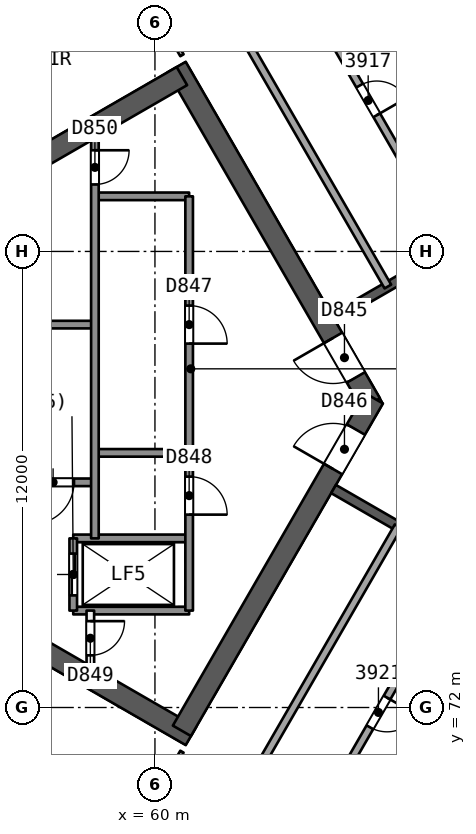
"""IFC4 building model, lengths in metres.
Left out: names, types, materials, properties, quantities, classifications, styles, units other than length and angle.
Written with IfcOpenShell. Run it as: python <this file> out.ifc"""

import sys

from ifc_helpers import new_model, si_unit, direction, frame, frame_2d, origin, place, context, subcontext, project, spatial, rectangle, extrude, element, fill, save


model = new_model("IFC4")
c1 = context("Model", 3, precision=1e-05, world=origin(), true_north=direction((0.0, 1.0)))
c2 = subcontext(c1, "Body", "Model", "MODEL_VIEW")
j1 = project(units=[si_unit("LENGTHUNIT", "METRE"), si_unit("PLANEANGLEUNIT", "RADIAN")], contexts=[c1])
p1 = place(None, origin())
s1 = spatial("IfcSite", under=j1, at=p1, CompositionType="ELEMENT")
p2 = place(p1, origin())
s2 = spatial("IfcBuilding", under=s1, at=p2, CompositionType="ELEMENT")
p3 = place(p2, frame((0.0, 0.0, 163.7)))
s3 = spatial("IfcBuildingStorey", under=s2, at=p3, CompositionType="ELEMENT", Elevation=163.7)
p4 = place(p3, frame((65.682, 80.0, 0.0), z_axis=(0.0, 0.0, 1.0), x_axis=(-0.500000202252, 0.866025287014, 0.0)))
e1 = element("IfcWall", 1, at=p4, inside=s3, PredefinedType="SHEAR", context=c2, shape_type="SweptSolid", body=[
    extrude(rectangle(XDim=10.221, YDim=0.55, at=frame_2d((5.111, 0.0))), origin(), (0.0, 0.0, 1.0), 3.7),
])
p5 = place(p4, frame((0.791, 0.0, 0.0)))
e2 = element("IfcOpeningElement", 2, at=p5, cuts=e1, PredefinedType="OPENING", context=c2, shape_type="SweptSolid", body=[
    extrude(rectangle(XDim=1.2, YDim=2.1, at=frame_2d((0.6, 1.05))), frame((0.0, 0.286, 0.0), z_axis=(0.0, -1.0, 0.0), x_axis=(1.0, 0.0, 0.0)), (0.0, 0.0, 1.0), 0.571),
])
p6 = place(p3, frame((60.709, 88.614, 0.0), z_axis=(0.0, 0.0, 1.0), x_axis=(-0.866020164116, -0.500009075263, 0.0)))
e3 = element("IfcWall", 3, at=p6, inside=s3, PredefinedType="SHEAR", context=c2, shape_type="SweptSolid", body=[
    extrude(rectangle(XDim=14.058, YDim=0.55, at=frame_2d((7.029, 0.0))), origin(), (0.0, 0.0, 1.0), 3.7),
])
p7 = place(p3, frame((48.672, 78.336, 0.0), z_axis=(0.0, 0.0, 1.0), x_axis=(0.866023530946, -0.500003243837, 0.0)))
e4 = element("IfcWall", 4, at=p7, inside=s3, PredefinedType="SHEAR", context=c2, shape_type="SweptSolid", body=[
    extrude(rectangle(XDim=14.175, YDim=0.55, at=frame_2d((7.087, 0.0))), origin(), (0.0, 0.0, 1.0), 3.7),
])
p8 = place(p3, frame((60.709, 71.386, 0.0), z_axis=(0.0, 0.0, 1.0), x_axis=(0.500015938302, 0.866016201606, 0.0)))
e5 = element("IfcWall", 5, at=p8, inside=s3, PredefinedType="SHEAR", context=c2, shape_type="SweptSolid", body=[
    extrude(rectangle(XDim=10.105, YDim=0.55, at=frame_2d((5.053, 0.0))), origin(), (0.0, 0.0, 1.0), 3.7),
])
p9 = place(p8, frame((7.955, 0.0, 0.0)))
e6 = element("IfcOpeningElement", 6, at=p9, cuts=e5, PredefinedType="OPENING", context=c2, shape_type="SweptSolid", body=[
    extrude(rectangle(XDim=1.2, YDim=2.1, at=frame_2d((0.6, 1.05))), frame((0.0, 0.286, 0.0), z_axis=(0.0, -1.0, 0.0), x_axis=(1.0, 0.0, 0.0)), (0.0, 0.0, 1.0), 0.571),
])
p10 = place(p3, frame((78.2, 90.046, 0.0), z_axis=(0.0, 0.0, 1.0), x_axis=(-0.866026492143, -0.499998114903, 0.0)))
e7 = element("IfcWall", 7, at=p10, inside=s3, PredefinedType="SHEAR", context=c2, shape_type="SweptSolid", body=[
    extrude(rectangle(XDim=15.588, YDim=0.25, at=frame_2d((7.794, 0.0))), origin(), (0.0, 0.0, 1.0), 3.25),
])
p11 = place(p10, frame((3.138, 0.0, 0.0)))
e8 = element("IfcOpeningElement", 8, at=p11, cuts=e7, PredefinedType="OPENING", context=c2, shape_type="SweptSolid", body=[
    extrude(rectangle(XDim=1.0, YDim=2.1, at=frame_2d((0.5, 1.05))), frame((0.0, 0.135, 0.0), z_axis=(0.0, -1.0, 0.0), x_axis=(1.0, 0.0, 0.0)), (0.0, 0.0, 1.0), 0.271),
])
p12 = place(p10, frame((5.629, 0.0, 0.0)))
e9 = element("IfcOpeningElement", 9, at=p12, cuts=e7, PredefinedType="OPENING", context=c2, shape_type="SweptSolid", body=[
    extrude(rectangle(XDim=0.9, YDim=2.1, at=frame_2d((0.45, 1.05))), frame((0.0, 0.135, 0.0), z_axis=(0.0, -1.0, 0.0), x_axis=(1.0, 0.0, 0.0)), (0.0, 0.0, 1.0), 0.271),
])
p13 = place(p10, frame((8.435, 0.0, 0.0)))
e10 = element("IfcOpeningElement", 10, at=p13, cuts=e7, PredefinedType="OPENING", context=c2, shape_type="SweptSolid", body=[
    extrude(rectangle(XDim=0.9, YDim=2.1, at=frame_2d((0.45, 1.05))), frame((0.0, 0.135, 0.0), z_axis=(0.0, -1.0, 0.0), x_axis=(1.0, 0.0, 0.0)), (0.0, 0.0, 1.0), 0.271),
])
p14 = place(p10, frame((12.438, 0.0, 0.0)))
e11 = element("IfcOpeningElement", 11, at=p14, cuts=e7, PredefinedType="OPENING", context=c2, shape_type="SweptSolid", body=[
    extrude(rectangle(XDim=1.0, YDim=2.1, at=frame_2d((0.5, 1.05))), frame((0.0, 0.135, 0.0), z_axis=(0.0, -1.0, 0.0), x_axis=(1.0, 0.0, 0.0)), (0.0, 0.0, 1.0), 0.271),
])
p15 = place(p3, frame((64.7, 77.748, 0.0), z_axis=(0.0, 0.0, 1.0), x_axis=(0.866026492143, -0.499998114903, 0.0)))
e12 = element("IfcWall", 12, at=p15, inside=s3, PredefinedType="SHEAR", context=c2, shape_type="SweptSolid", body=[
    extrude(rectangle(XDim=15.588, YDim=0.25, at=frame_2d((7.794, 0.0))), origin(), (0.0, 0.0, 1.0), 3.25),
])
p16 = place(p15, frame((2.462, 0.0, 0.0)))
e13 = element("IfcOpeningElement", 13, at=p16, cuts=e12, PredefinedType="OPENING", context=c2, shape_type="SweptSolid", body=[
    extrude(rectangle(XDim=1.0, YDim=2.1, at=frame_2d((0.5, 1.05))), frame((0.0, 0.135, 0.0), z_axis=(0.0, -1.0, 0.0), x_axis=(1.0, 0.0, 0.0)), (0.0, 0.0, 1.0), 0.271),
])
p17 = place(p15, frame((8.129, 0.0, 0.0)))
e14 = element("IfcOpeningElement", 14, at=p17, cuts=e12, PredefinedType="OPENING", context=c2, shape_type="SweptSolid", body=[
    extrude(rectangle(XDim=1.2, YDim=2.4, at=frame_2d((0.6, 1.2))), frame((0.0, 0.135, 0.0), z_axis=(0.0, -1.0, 0.0), x_axis=(1.0, 0.0, 0.0)), (0.0, 0.0, 1.0), 0.271),
])
p18 = place(p15, frame((11.762, 0.0, 0.0)))
e15 = element("IfcOpeningElement", 15, at=p18, cuts=e12, PredefinedType="OPENING", context=c2, shape_type="SweptSolid", body=[
    extrude(rectangle(XDim=1.0, YDim=2.1, at=frame_2d((0.5, 1.05))), frame((0.0, 0.135, 0.0), z_axis=(0.0, -1.0, 0.0), x_axis=(1.0, 0.0, 0.0)), (0.0, 0.0, 1.0), 0.271),
])
for number, where, z_axis, x_axis in (
    (16, (65.944, 96.309, 0.0), (0.0, 0.0, 1.0), (0.5, -0.866, 0.0)),
    (17, (63.514, 94.906, 0.0), (0.0, 0.0, 1.0), (0.5, -0.866, 0.0)),
):
    element("IfcWall", number, at=place(p3, frame(where, z_axis=z_axis, x_axis=x_axis)), inside=s3, PredefinedType="PARTITIONING", context=c2, shape_type="SweptSolid", body=[
        extrude(rectangle(XDim=11.552, YDim=0.2, at=frame_2d((5.776, 0.0))), origin(), (0.0, 0.0, 1.0), 3.25),
    ])
p19 = place(p3, frame((58.924, 92.256, 0.0), z_axis=(0.0, 0.0, 1.0), x_axis=(0.4999827131, -0.866035384151, 0.0)))
e18 = element("IfcWall", 18, at=p19, inside=s3, PredefinedType="PARTITIONING", context=c2, shape_type="SweptSolid", body=[
    extrude(rectangle(XDim=3.573, YDim=0.1, at=frame_2d((1.787, 0.0))), origin(), (0.0, 0.0, 1.0), 3.25),
])
p20 = place(p19, frame((1.336, 0.0, 0.0)))
e19 = element("IfcOpeningElement", 19, at=p20, cuts=e18, PredefinedType="OPENING", context=c2, shape_type="SweptSolid", body=[
    extrude(rectangle(XDim=0.9, YDim=2.1, at=frame_2d((0.45, 1.05))), frame((0.0, 0.061, 0.0), z_axis=(0.0, -1.0, 0.0), x_axis=(1.0, 0.0, 0.0)), (0.0, 0.0, 1.0), 0.121),
])
p21 = place(p3, frame((66.129, 83.077, 0.0), z_axis=(0.0, 0.0, 1.0), x_axis=(-0.5000018851, 0.866024315419, 0.0)))
e20 = element("IfcWall", 20, at=p21, inside=s3, PredefinedType="PARTITIONING", context=c2, shape_type="SweptSolid", body=[
    extrude(rectangle(XDim=9.0, YDim=0.2, at=frame_2d((4.5, 0.0))), origin(), (0.0, 0.0, 1.0), 3.25),
])
p22 = place(p3, frame((63.361, 91.871, 0.0), z_axis=(0.0, 0.0, 1.0), x_axis=(0.5000018851, -0.866024315419, 0.0)))
e21 = element("IfcWall", 21, at=p22, inside=s3, PredefinedType="PARTITIONING", context=c2, shape_type="SweptSolid", body=[
    extrude(rectangle(XDim=9.0, YDim=0.2, at=frame_2d((4.5, 0.0))), origin(), (0.0, 0.0, 1.0), 3.25),
])
p23 = place(p22, frame((4.05, 0.0, 0.0)))
e22 = element("IfcOpeningElement", 22, at=p23, cuts=e21, PredefinedType="OPENING", context=c2, shape_type="SweptSolid", body=[
    extrude(rectangle(XDim=0.9, YDim=2.1, at=frame_2d((0.45, 1.05))), frame((0.0, 0.11, 0.0), z_axis=(0.0, -1.0, 0.0), x_axis=(1.0, 0.0, 0.0)), (0.0, 0.0, 1.0), 0.221),
])
p24 = place(p3, frame((60.71, 70.838, 0.0), z_axis=(0.0, 0.0, 1.0), x_axis=(-0.4999827131, -0.866035384151, 0.0)))
e23 = element("IfcWall", 23, at=p24, inside=s3, PredefinedType="PARTITIONING", context=c2, shape_type="SweptSolid", body=[
    extrude(rectangle(XDim=3.573, YDim=0.1, at=frame_2d((1.787, 0.0))), origin(), (0.0, 0.0, 1.0), 3.25),
])
p25 = place(p24, frame((1.336, 0.0, 0.0)))
e24 = element("IfcOpeningElement", 24, at=p25, cuts=e23, PredefinedType="OPENING", context=c2, shape_type="SweptSolid", body=[
    extrude(rectangle(XDim=0.9, YDim=2.1, at=frame_2d((0.45, 1.05))), frame((0.0, 0.061, 0.0), z_axis=(0.0, -1.0, 0.0), x_axis=(1.0, 0.0, 0.0)), (0.0, 0.0, 1.0), 0.121),
])
p26 = place(p3, frame((68.131, 75.767, 0.0), z_axis=(0.0, 0.0, 1.0), x_axis=(-0.5000018851, -0.866024315419, 0.0)))
e25 = element("IfcWall", 25, at=p26, inside=s3, PredefinedType="PARTITIONING", context=c2, shape_type="SweptSolid", body=[
    extrude(rectangle(XDim=9.0, YDim=0.2, at=frame_2d((4.5, 0.0))), origin(), (0.0, 0.0, 1.0), 3.25),
])
p27 = place(p26, frame((4.05, 0.0, 0.0)))
e26 = element("IfcOpeningElement", 26, at=p27, cuts=e25, PredefinedType="OPENING", context=c2, shape_type="SweptSolid", body=[
    extrude(rectangle(XDim=0.9, YDim=2.1, at=frame_2d((0.45, 1.05))), frame((0.0, 0.11, 0.0), z_axis=(0.0, -1.0, 0.0), x_axis=(1.0, 0.0, 0.0)), (0.0, 0.0, 1.0), 0.221),
])
p28 = place(p3, frame((61.899, 68.973, 0.0), z_axis=(0.0, 0.0, 1.0), x_axis=(0.5000018851, 0.866024315419, 0.0)))
e27 = element("IfcWall", 27, at=p28, inside=s3, PredefinedType="PARTITIONING", context=c2, shape_type="SweptSolid", body=[
    extrude(rectangle(XDim=9.0, YDim=0.2, at=frame_2d((4.5, 0.0))), origin(), (0.0, 0.0, 1.0), 3.25),
])
p29 = place(p3, frame((64.054, 64.782, 0.0), z_axis=(0.0, 0.0, 1.0), x_axis=(0.499998700539, 0.866026154027, 0.0)))
e28 = element("IfcWall", 28, at=p29, inside=s3, PredefinedType="PARTITIONING", context=c2, shape_type="SweptSolid", body=[
    extrude(rectangle(XDim=11.552, YDim=0.2, at=frame_2d((5.776, 0.0))), origin(), (0.0, 0.0, 1.0), 3.25),
])
p30 = place(p3, frame((42.189, 82.766, 0.0), z_axis=(0.0, 0.0, 1.0), x_axis=(0.866025862562, 0.499999205373, 0.0)))
e29 = element("IfcWall", 29, at=p30, inside=s3, PredefinedType="SOLIDWALL", context=c2, shape_type="SweptSolid", body=[
    extrude(rectangle(XDim=54.064, YDim=0.3, at=frame_2d((27.032, 0.0))), origin(), (0.0, 0.0, 1.0), 3.25),
])
p31 = place(p30, frame((20.688, 0.0, 0.0)))
e30 = element("IfcOpeningElement", 30, at=p31, cuts=e29, PredefinedType="OPENING", context=c2, shape_type="SweptSolid", body=[
    extrude(rectangle(XDim=2.4, YDim=2.4, at=frame_2d((1.2, 1.2))), frame((0.0, 0.161, 0.0), z_axis=(0.0, -1.0, 0.0), x_axis=(1.0, 0.0, 0.0)), (0.0, 0.0, 1.0), 0.321),
])
p32 = place(p30, frame((9.629, 0.0, 0.0)))
e31 = element("IfcOpeningElement", 31, at=p32, cuts=e29, PredefinedType="OPENING", context=c2, shape_type="SweptSolid", body=[
    extrude(rectangle(XDim=2.4, YDim=2.4, at=frame_2d((1.2, 1.2))), frame((0.0, 0.161, 0.0), z_axis=(0.0, -1.0, 0.0), x_axis=(1.0, 0.0, 0.0)), (0.0, 0.0, 1.0), 0.321),
])
p33 = place(p30, frame((40.951, 0.0, 0.0)))
e32 = element("IfcOpeningElement", 32, at=p33, cuts=e29, PredefinedType="OPENING", context=c2, shape_type="SweptSolid", body=[
    extrude(rectangle(XDim=2.4, YDim=2.4, at=frame_2d((1.2, 1.2))), frame((0.0, 0.161, 0.0), z_axis=(0.0, -1.0, 0.0), x_axis=(1.0, 0.0, 0.0)), (0.0, 0.0, 1.0), 0.321),
])
p34 = place(p30, frame((27.847, 0.0, 0.9)))
e33 = element("IfcOpeningElement", 33, at=p34, cuts=e29, PredefinedType="OPENING", context=c2, shape_type="SweptSolid", body=[
    extrude(rectangle(XDim=1.8, YDim=1.5, at=frame_2d((0.9, 0.75))), frame((0.0, 0.161, 0.0), z_axis=(0.0, -1.0, 0.0), x_axis=(1.0, 0.0, 0.0)), (0.0, 0.0, 1.0), 0.321),
])
p35 = place(p30, frame((25.041, 0.0, 0.9)))
e34 = element("IfcOpeningElement", 34, at=p35, cuts=e29, PredefinedType="OPENING", context=c2, shape_type="SweptSolid", body=[
    extrude(rectangle(XDim=1.8, YDim=1.5, at=frame_2d((0.9, 0.75))), frame((0.0, 0.161, 0.0), z_axis=(0.0, -1.0, 0.0), x_axis=(1.0, 0.0, 0.0)), (0.0, 0.0, 1.0), 0.321),
])
p36 = place(p3, frame((89.01, 50.202, 0.0), z_axis=(0.0, 0.0, 1.0), x_axis=(-0.866025862562, 0.499999205373, 0.0)))
e35 = element("IfcWall", 35, at=p36, inside=s3, PredefinedType="SOLIDWALL", context=c2, shape_type="SweptSolid", body=[
    extrude(rectangle(XDim=54.064, YDim=0.3, at=frame_2d((27.032, 0.0))), origin(), (0.0, 0.0, 1.0), 3.25),
])
p37 = place(p36, frame((30.665, 0.0, 0.0)))
e36 = element("IfcOpeningElement", 36, at=p37, cuts=e35, PredefinedType="OPENING", context=c2, shape_type="SweptSolid", body=[
    extrude(rectangle(XDim=2.4, YDim=2.4, at=frame_2d((1.2, 1.2))), frame((0.0, 0.161, 0.0), z_axis=(0.0, -1.0, 0.0), x_axis=(1.0, 0.0, 0.0)), (0.0, 0.0, 1.0), 0.321),
])
p38 = place(p36, frame((42.011, 0.0, 0.0)))
e37 = element("IfcOpeningElement", 37, at=p38, cuts=e35, PredefinedType="OPENING", context=c2, shape_type="SweptSolid", body=[
    extrude(rectangle(XDim=2.4, YDim=2.4, at=frame_2d((1.2, 1.2))), frame((0.0, 0.161, 0.0), z_axis=(0.0, -1.0, 0.0), x_axis=(1.0, 0.0, 0.0)), (0.0, 0.0, 1.0), 0.321),
])
p39 = place(p36, frame((10.402, 0.0, 0.0)))
e38 = element("IfcOpeningElement", 38, at=p39, cuts=e35, PredefinedType="OPENING", context=c2, shape_type="SweptSolid", body=[
    extrude(rectangle(XDim=2.4, YDim=2.4, at=frame_2d((1.2, 1.2))), frame((0.0, 0.161, 0.0), z_axis=(0.0, -1.0, 0.0), x_axis=(1.0, 0.0, 0.0)), (0.0, 0.0, 1.0), 0.321),
])
p40 = place(p36, frame((25.197, 0.0, 0.9)))
e39 = element("IfcOpeningElement", 39, at=p40, cuts=e35, PredefinedType="OPENING", context=c2, shape_type="SweptSolid", body=[
    extrude(rectangle(XDim=1.8, YDim=1.5, at=frame_2d((0.9, 0.75))), frame((0.0, 0.161, 0.0), z_axis=(0.0, -1.0, 0.0), x_axis=(1.0, 0.0, 0.0)), (0.0, 0.0, 1.0), 0.321),
])
p41 = place(p3, frame((60.9, 85.45, 0.0), z_axis=(0.0, 0.0, 1.0), x_axis=(-1.0, 0.0, 0.0)))
e40 = element("IfcWall", 40, at=p41, inside=s3, PredefinedType="SOLIDWALL", context=c2, shape_type="SweptSolid", body=[
    extrude(rectangle(XDim=2.48, YDim=0.2, at=frame_2d((1.24, 0.0))), origin(), (0.0, 0.0, 1.0), 3.25),
])
p42 = place(p3, frame((58.42, 82.075, 0.0), z_axis=(0.0, 0.0, 1.0), x_axis=(-1.0, 0.0, 0.0)))
e41 = element("IfcWall", 41, at=p42, inside=s3, PredefinedType="SOLIDWALL", context=c2, shape_type="SweptSolid", body=[
    extrude(rectangle(XDim=7.7, YDim=0.2, at=frame_2d((3.85, 0.0))), origin(), (0.0, 0.0, 1.0), 3.25),
])
p43 = place(p3, frame((60.9, 78.7, 0.0), z_axis=(0.0, 0.0, 1.0), x_axis=(-1.0, 0.0, 0.0)))
e42 = element("IfcWall", 42, at=p43, inside=s3, PredefinedType="SOLIDWALL", context=c2, shape_type="SweptSolid", body=[
    extrude(rectangle(XDim=2.48, YDim=0.2, at=frame_2d((1.24, 0.0))), origin(), (0.0, 0.0, 1.0), 3.25),
])
p44 = place(p3, frame((58.42, 77.925, 0.0), z_axis=(0.0, 0.0, 1.0), x_axis=(-1.0, 0.0, 0.0)))
e43 = element("IfcWall", 43, at=p44, inside=s3, PredefinedType="SOLIDWALL", context=c2, shape_type="SweptSolid", body=[
    extrude(rectangle(XDim=7.7, YDim=0.2, at=frame_2d((3.85, 0.0))), origin(), (0.0, 0.0, 1.0), 3.25),
])
p45 = place(p44, frame((0.55, 0.0, 0.0)))
e44 = element("IfcOpeningElement", 44, at=p45, cuts=e43, PredefinedType="OPENING", context=c2, shape_type="SweptSolid", body=[
    extrude(rectangle(XDim=1.1, YDim=2.1, at=frame_2d((0.55, 1.05))), frame((0.0, 0.11, 0.0), z_axis=(0.0, -1.0, 0.0), x_axis=(1.0, 0.0, 0.0)), (0.0, 0.0, 1.0), 0.221),
])
for number, where, z_axis, x_axis in (
    (45, (60.9, 76.45, 0.0), (0.0, 0.0, 1.0), (-1.0, 0.0, 0.0)),
    (46, (60.9, 74.55, 0.0), (0.0, 0.0, 1.0), (-1.0, 0.0, 0.0)),
):
    element("IfcWall", number, at=place(p3, frame(where, z_axis=z_axis, x_axis=x_axis)), inside=s3, PredefinedType="SOLIDWALL", context=c2, shape_type="SweptSolid", body=[
        extrude(rectangle(XDim=3.05, YDim=0.2, at=frame_2d((1.525, 0.0))), origin(), (0.0, 0.0, 1.0), 3.25),
    ])
p46 = place(p3, frame((60.9, 85.45, 0.0), z_axis=(0.0, 0.0, 1.0), x_axis=(0.0, -1.0, 0.0)))
e47 = element("IfcWall", 47, at=p46, inside=s3, PredefinedType="SOLIDWALL", context=c2, shape_type="SweptSolid", body=[
    extrude(rectangle(XDim=10.9, YDim=0.2, at=frame_2d((5.45, 0.0))), origin(), (0.0, 0.0, 1.0), 3.25),
])
p47 = place(p46, frame((2.875, 0.0, 0.0)))
e48 = element("IfcOpeningElement", 48, at=p47, cuts=e47, PredefinedType="OPENING", context=c2, shape_type="SweptSolid", body=[
    extrude(rectangle(XDim=1.0, YDim=2.1, at=frame_2d((0.5, 1.05))), frame((0.0, 0.11, 0.0), z_axis=(0.0, -1.0, 0.0), x_axis=(1.0, 0.0, 0.0)), (0.0, 0.0, 1.0), 0.221),
])
p48 = place(p46, frame((7.375, 0.0, 0.0)))
e49 = element("IfcOpeningElement", 49, at=p48, cuts=e47, PredefinedType="OPENING", context=c2, shape_type="SweptSolid", body=[
    extrude(rectangle(XDim=1.0, YDim=2.1, at=frame_2d((0.5, 1.05))), frame((0.0, 0.11, 0.0), z_axis=(0.0, -1.0, 0.0), x_axis=(1.0, 0.0, 0.0)), (0.0, 0.0, 1.0), 0.221),
])
p49 = place(p3, frame((58.42, 86.974, 0.0), z_axis=(0.0, 0.0, 1.0), x_axis=(0.0, -1.0, 0.0)))
e50 = element("IfcWall", 50, at=p49, inside=s3, PredefinedType="SOLIDWALL", context=c2, shape_type="SweptSolid", body=[
    extrude(rectangle(XDim=10.524, YDim=0.2, at=frame_2d((5.262, 0.0))), origin(), (0.0, 0.0, 1.0), 3.25),
])
p50 = place(p49, frame((0.312, 0.0, 0.0)))
e51 = element("IfcOpeningElement", 51, at=p50, cuts=e50, PredefinedType="OPENING", context=c2, shape_type="SweptSolid", body=[
    extrude(rectangle(XDim=0.9, YDim=2.1, at=frame_2d((0.45, 1.05))), frame((0.0, 0.11, 0.0), z_axis=(0.0, -1.0, 0.0), x_axis=(1.0, 0.0, 0.0)), (0.0, 0.0, 1.0), 0.221),
])
p51 = place(p3, frame((58.3, 74.55, 0.0), z_axis=(0.0, 0.0, 1.0), x_axis=(0.0, -1.0, 0.0)))
e52 = element("IfcWall", 52, at=p51, inside=s3, PredefinedType="PARTITIONING", context=c2, shape_type="SweptSolid", body=[
    extrude(rectangle(XDim=1.455, YDim=0.2, at=frame_2d((0.728, 0.0))), origin(), (0.0, 0.0, 1.0), 3.25),
])
p52 = place(p51, frame((0.278, 0.0, 0.0)))
e53 = element("IfcOpeningElement", 53, at=p52, cuts=e52, PredefinedType="OPENING", context=c2, shape_type="SweptSolid", body=[
    extrude(rectangle(XDim=0.9, YDim=2.1, at=frame_2d((0.45, 1.05))), frame((0.0, 0.11, 0.0), z_axis=(0.0, -1.0, 0.0), x_axis=(1.0, 0.0, 0.0)), (0.0, 0.0, 1.0), 0.221),
])
p53 = place(p3, frame((57.85, 76.45, 0.0), z_axis=(0.0, 0.0, 1.0), x_axis=(0.0, -1.0, 0.0)))
e54 = element("IfcWall", 54, at=p53, inside=s3, PredefinedType="SOLIDWALL", context=c2, shape_type="SweptSolid", body=[
    extrude(rectangle(XDim=1.9, YDim=0.2, at=frame_2d((0.95, 0.0))), origin(), (0.0, 0.0, 1.0), 3.25),
])
p54 = place(p53, frame((0.4, 0.0, 0.0)))
e55 = element("IfcOpeningElement", 55, at=p54, cuts=e54, PredefinedType="OPENING", context=c2, shape_type="SweptSolid", body=[
    extrude(rectangle(XDim=1.1, YDim=2.1, at=frame_2d((0.55, 1.05))), frame((0.0, 0.11, 0.0), z_axis=(0.0, -1.0, 0.0), x_axis=(1.0, 0.0, 0.0)), (0.0, 0.0, 1.0), 0.221),
])
p55 = place(p23, origin())
e56 = element("IfcDoor", 56, at=p55, inside=s3, OperationType="SINGLE_SWING_RIGHT", PredefinedType="NOTDEFINED", context=c2, shape_type="SweptSolid", body=[
    extrude(rectangle(XDim=0.9, YDim=2.1, at=frame_2d((0.45, 1.05))), frame((0.0, 0.025, 0.0), z_axis=(0.0, -1.0, 0.0), x_axis=(1.0, 0.0, 0.0)), (0.0, 0.0, 1.0), 0.05),
])
fill(e22, e56)
p56 = place(p27, origin())
e57 = element("IfcDoor", 57, at=p56, inside=s3, OperationType="SINGLE_SWING_LEFT", PredefinedType="NOTDEFINED", context=c2, shape_type="SweptSolid", body=[
    extrude(rectangle(XDim=0.9, YDim=2.1, at=frame_2d((0.45, 1.05))), frame((0.0, 0.025, 0.0), z_axis=(0.0, -1.0, 0.0), x_axis=(1.0, 0.0, 0.0)), (0.0, 0.0, 1.0), 0.05),
])
fill(e26, e57)
p57 = place(p5, origin())
e58 = element("IfcDoor", 58, at=p57, inside=s3, OperationType="SINGLE_SWING_RIGHT", PredefinedType="NOTDEFINED", context=c2, shape_type="SweptSolid", body=[
    extrude(rectangle(XDim=1.2, YDim=2.1, at=frame_2d((0.6, 1.05))), frame((0.0, 0.025, 0.0), z_axis=(0.0, -1.0, 0.0), x_axis=(1.0, 0.0, 0.0)), (0.0, 0.0, 1.0), 0.05),
])
fill(e2, e58)
p58 = place(p9, origin())
e59 = element("IfcDoor", 59, at=p58, inside=s3, OperationType="SINGLE_SWING_LEFT", PredefinedType="NOTDEFINED", context=c2, shape_type="SweptSolid", body=[
    extrude(rectangle(XDim=1.2, YDim=2.1, at=frame_2d((0.6, 1.05))), frame((0.0, 0.025, 0.0), z_axis=(0.0, -1.0, 0.0), x_axis=(1.0, 0.0, 0.0)), (0.0, 0.0, 1.0), 0.05),
])
fill(e6, e59)
p59 = place(p54, origin())
e60 = element("IfcDoor", 60, at=p59, inside=s3, OperationType="SLIDING_TO_RIGHT", PredefinedType="NOTDEFINED", context=c2, shape_type="SweptSolid", body=[
    extrude(rectangle(XDim=1.1, YDim=2.1, at=frame_2d((0.55, 1.05))), frame((0.0, 0.025, 0.0), z_axis=(0.0, -1.0, 0.0), x_axis=(1.0, 0.0, 0.0)), (0.0, 0.0, 1.0), 0.05),
])
fill(e55, e60)
p60 = place(p47, origin())
e61 = element("IfcDoor", 61, at=p60, inside=s3, OperationType="SINGLE_SWING_RIGHT", PredefinedType="NOTDEFINED", context=c2, shape_type="SweptSolid", body=[
    extrude(rectangle(XDim=1.0, YDim=2.1, at=frame_2d((0.5, 1.05))), frame((0.0, 0.025, 0.0), z_axis=(0.0, -1.0, 0.0), x_axis=(1.0, 0.0, 0.0)), (0.0, 0.0, 1.0), 0.05),
])
fill(e48, e61)
p61 = place(p48, origin())
e62 = element("IfcDoor", 62, at=p61, inside=s3, OperationType="SINGLE_SWING_RIGHT", PredefinedType="NOTDEFINED", context=c2, shape_type="SweptSolid", body=[
    extrude(rectangle(XDim=1.0, YDim=2.1, at=frame_2d((0.5, 1.05))), frame((0.0, 0.025, 0.0), z_axis=(0.0, -1.0, 0.0), x_axis=(1.0, 0.0, 0.0)), (0.0, 0.0, 1.0), 0.05),
])
fill(e49, e62)
p62 = place(p52, origin())
e63 = element("IfcDoor", 63, at=p62, inside=s3, OperationType="SINGLE_SWING_LEFT", PredefinedType="NOTDEFINED", context=c2, shape_type="SweptSolid", body=[
    extrude(rectangle(XDim=0.9, YDim=2.1, at=frame_2d((0.45, 1.05))), frame((0.0, 0.025, 0.0), z_axis=(0.0, -1.0, 0.0), x_axis=(1.0, 0.0, 0.0)), (0.0, 0.0, 1.0), 0.05),
])
fill(e53, e63)
p63 = place(p50, origin())
e64 = element("IfcDoor", 64, at=p63, inside=s3, OperationType="SINGLE_SWING_LEFT", PredefinedType="NOTDEFINED", context=c2, shape_type="SweptSolid", body=[
    extrude(rectangle(XDim=0.9, YDim=2.1, at=frame_2d((0.45, 1.05))), frame((0.0, 0.025, 0.0), z_axis=(0.0, -1.0, 0.0), x_axis=(1.0, 0.0, 0.0)), (0.0, 0.0, 1.0), 0.05),
])
fill(e51, e64)
p64 = place(p45, origin())
e65 = element("IfcDoor", 65, at=p64, inside=s3, OperationType="SINGLE_SWING_RIGHT", PredefinedType="NOTDEFINED", context=c2, shape_type="SweptSolid", body=[
    extrude(rectangle(XDim=1.1, YDim=2.1, at=frame_2d((0.55, 1.05))), frame((0.0, 0.025, 0.0), z_axis=(0.0, -1.0, 0.0), x_axis=(1.0, 0.0, 0.0)), (0.0, 0.0, 1.0), 0.05),
])
fill(e44, e65)
save(model, sys.argv[1])
